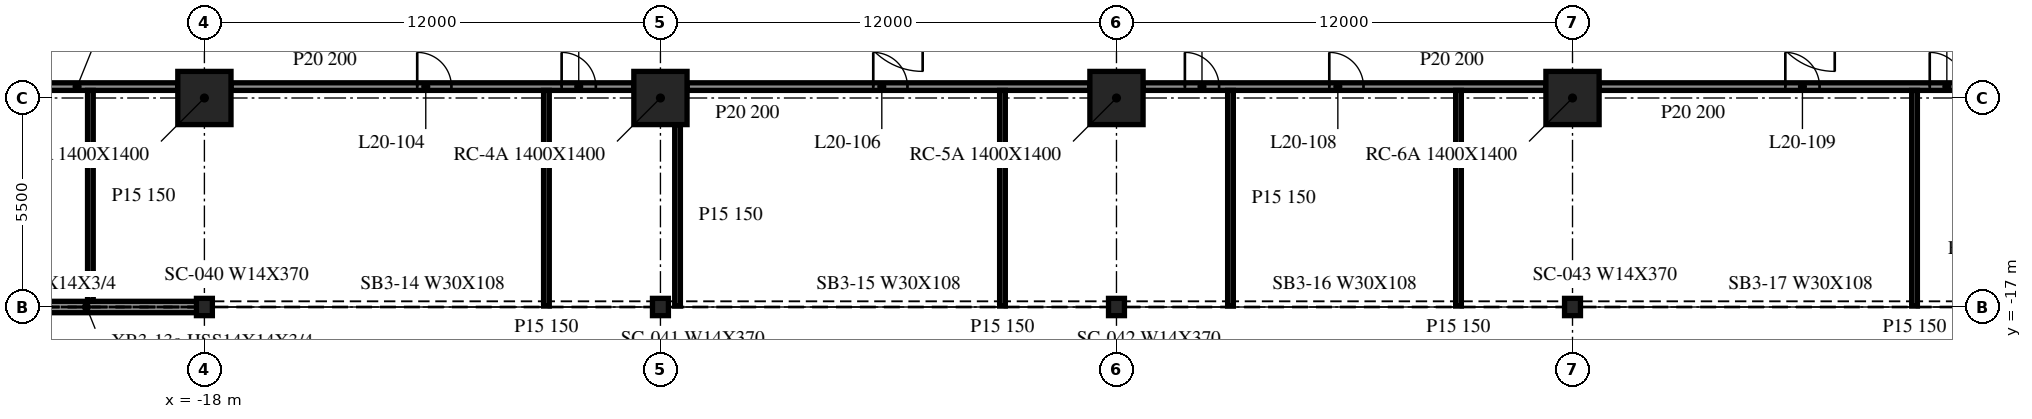
"""IFC4 building model, lengths in metres.
Left out: names, types, materials, properties, quantities, classifications, styles, units other than length and angle.
Written with IfcOpenShell. Run it as: python <this file> out.ifc"""

import sys

from ifc_helpers import new_model, si_unit, direction, frame, frame_2d, origin, origin_2d, place, context, subcontext, project, spatial, rectangle, i_section, extrude, element, fill, save


model = new_model("IFC4")
c1 = context("Model", 3, precision=1e-05, world=origin(), true_north=direction((0.0, 1.0)))
c2 = subcontext(c1, "Body", "Model", "MODEL_VIEW")
j1 = project(units=[si_unit("LENGTHUNIT", "METRE"), si_unit("PLANEANGLEUNIT", "RADIAN")], contexts=[c1])
p1 = place(None, origin())
s1 = spatial("IfcSite", under=j1, at=p1, CompositionType="ELEMENT")
p2 = place(p1, origin())
s2 = spatial("IfcBuilding", under=s1, at=p2, CompositionType="ELEMENT")
p3 = place(p2, frame((0.0, 0.0, 88.9)))
s3 = spatial("IfcBuildingStorey", under=s2, at=p3, CompositionType="ELEMENT", Elevation=88.9)
for number, where, z_axis, x_axis in (
    (1, (-18.0, -11.5, -0.34), (0.0, 0.0, 1.0), (1.0, 0.0, 0.0)),
    (2, (-6.0, -11.5, -0.34), (0.0, 0.0, 1.0), (1.0, 0.0, 0.0)),
    (3, (6.0, -11.5, -0.34), (0.0, 0.0, 1.0), (1.0, 0.0, 0.0)),
    (4, (18.0, -11.5, -0.34), (0.0, 0.0, 1.0), (1.0, 0.0, 0.0)),
):
    element("IfcColumn", number, at=place(p3, frame(where, z_axis=z_axis, x_axis=x_axis)), inside=s3, PredefinedType="COLUMN", context=c2, shape_type="SweptSolid", body=[
        extrude(rectangle(XDim=1.4, YDim=1.4, at=origin_2d()), origin(), (0.0, 0.0, 1.0), 4.1),
    ])
for number, where, z_axis, x_axis in (
    (5, (-18.0, -17.0, -0.34), (0.0, 0.0, 1.0), (1.0, 0.0, 0.0)),
    (6, (-6.0, -17.0, -0.34), (0.0, 0.0, 1.0), (1.0, 0.0, 0.0)),
    (7, (6.0, -17.0, -0.34), (0.0, 0.0, 1.0), (1.0, 0.0, 0.0)),
    (8, (18.0, -17.0, -0.34), (0.0, 0.0, 1.0), (1.0, 0.0, 0.0)),
):
    element("IfcColumn", number, at=place(p3, frame(where, z_axis=z_axis, x_axis=x_axis)), inside=s3, PredefinedType="COLUMN", context=c2, shape_type="SweptSolid", body=[
        extrude(i_section(OverallWidth=0.419, OverallDepth=0.455, WebThickness=0.042, FlangeThickness=0.068, at=origin_2d()), origin(), (0.0, 0.0, 1.0), 4.1),
    ])
p4 = place(p3, frame((-29.979, -17.0, 0.0), z_axis=(0.0, 0.0, 1.0), x_axis=(1.0, 0.0, 0.0)))
e9 = element("IfcWall", 9, at=p4, inside=s3, PredefinedType="NOTDEFINED", context=c2, shape_type="SweptSolid", body=[
    extrude(rectangle(XDim=11.958, YDim=0.3, at=frame_2d((5.979, 0.0))), origin(), (0.0, 0.0, 1.0), 3.003),
])
p5 = place(p3, frame((-29.3, -11.2, 0.0), z_axis=(0.0, 0.0, 1.0), x_axis=(1.0, 0.0, 0.0)))
e10 = element("IfcWall", 10, at=p5, inside=s3, PredefinedType="PARTITIONING", context=c2, shape_type="SweptSolid", body=[
    extrude(rectangle(XDim=10.6, YDim=0.2, at=frame_2d((5.3, 0.0))), origin(), (0.0, 0.0, 1.0), 3.76),
])
p6 = place(p5, frame((1.5, 0.0, 0.0)))
e11 = element("IfcOpeningElement", 11, at=p6, cuts=e10, PredefinedType="OPENING", context=c2, shape_type="SweptSolid", body=[
    extrude(rectangle(XDim=0.9, YDim=2.1, at=frame_2d((0.45, 1.05))), frame((0.0, 0.11, 0.0), z_axis=(0.0, -1.0, 0.0), x_axis=(1.0, 0.0, 0.0)), (0.0, 0.0, 1.0), 0.22),
])
p7 = place(p5, frame((4.9, 0.0, 0.0)))
e12 = element("IfcOpeningElement", 12, at=p7, cuts=e10, PredefinedType="OPENING", context=c2, shape_type="SweptSolid", body=[
    extrude(rectangle(XDim=0.9, YDim=2.1, at=frame_2d((0.45, 1.05))), frame((0.0, 0.11, 0.0), z_axis=(0.0, -1.0, 0.0), x_axis=(1.0, 0.0, 0.0)), (0.0, 0.0, 1.0), 0.22),
])
p8 = place(p3, frame((-17.3, -11.2, 0.0), z_axis=(0.0, 0.0, 1.0), x_axis=(1.0, 0.0, 0.0)))
e13 = element("IfcWall", 13, at=p8, inside=s3, PredefinedType="PARTITIONING", context=c2, shape_type="SweptSolid", body=[
    extrude(rectangle(XDim=10.6, YDim=0.2, at=frame_2d((5.3, 0.0))), origin(), (0.0, 0.0, 1.0), 3.76),
])
p9 = place(p8, frame((4.9, 0.0, 0.0)))
e14 = element("IfcOpeningElement", 14, at=p9, cuts=e13, PredefinedType="OPENING", context=c2, shape_type="SweptSolid", body=[
    extrude(rectangle(XDim=0.9, YDim=2.1, at=frame_2d((0.45, 1.05))), frame((0.0, 0.11, 0.0), z_axis=(0.0, -1.0, 0.0), x_axis=(1.0, 0.0, 0.0)), (0.0, 0.0, 1.0), 0.22),
])
p10 = place(p8, frame((8.7, 0.0, 0.0)))
e15 = element("IfcOpeningElement", 15, at=p10, cuts=e13, PredefinedType="OPENING", context=c2, shape_type="SweptSolid", body=[
    extrude(rectangle(XDim=0.9, YDim=2.1, at=frame_2d((0.45, 1.05))), frame((0.0, 0.11, 0.0), z_axis=(0.0, -1.0, 0.0), x_axis=(1.0, 0.0, 0.0)), (0.0, 0.0, 1.0), 0.22),
])
p11 = place(p3, frame((-5.3, -11.2, 0.0), z_axis=(0.0, 0.0, 1.0), x_axis=(1.0, 0.0, 0.0)))
e16 = element("IfcWall", 16, at=p11, inside=s3, PredefinedType="PARTITIONING", context=c2, shape_type="SweptSolid", body=[
    extrude(rectangle(XDim=10.6, YDim=0.2, at=frame_2d((5.3, 0.0))), origin(), (0.0, 0.0, 1.0), 3.76),
])
p12 = place(p11, frame((4.9, 0.0, 0.0)))
e17 = element("IfcOpeningElement", 17, at=p12, cuts=e16, PredefinedType="OPENING", context=c2, shape_type="SweptSolid", body=[
    extrude(rectangle(XDim=0.9, YDim=2.1, at=frame_2d((0.45, 1.05))), frame((0.0, 0.11, 0.0), z_axis=(0.0, -1.0, 0.0), x_axis=(1.0, 0.0, 0.0)), (0.0, 0.0, 1.0), 0.22),
])
p13 = place(p3, frame((6.7, -11.2, 0.0), z_axis=(0.0, 0.0, 1.0), x_axis=(1.0, 0.0, 0.0)))
e18 = element("IfcWall", 18, at=p13, inside=s3, PredefinedType="PARTITIONING", context=c2, shape_type="SweptSolid", body=[
    extrude(rectangle(XDim=10.6, YDim=0.2, at=frame_2d((5.3, 0.0))), origin(), (0.0, 0.0, 1.0), 3.76),
])
p14 = place(p13, frame((1.1, 0.0, 0.0)))
e19 = element("IfcOpeningElement", 19, at=p14, cuts=e18, PredefinedType="OPENING", context=c2, shape_type="SweptSolid", body=[
    extrude(rectangle(XDim=0.9, YDim=2.1, at=frame_2d((0.45, 1.05))), frame((0.0, 0.11, 0.0), z_axis=(0.0, -1.0, 0.0), x_axis=(1.0, 0.0, 0.0)), (0.0, 0.0, 1.0), 0.22),
])
p15 = place(p13, frame((4.9, 0.0, 0.0)))
e20 = element("IfcOpeningElement", 20, at=p15, cuts=e18, PredefinedType="OPENING", context=c2, shape_type="SweptSolid", body=[
    extrude(rectangle(XDim=0.9, YDim=2.1, at=frame_2d((0.45, 1.05))), frame((0.0, 0.11, 0.0), z_axis=(0.0, -1.0, 0.0), x_axis=(1.0, 0.0, 0.0)), (0.0, 0.0, 1.0), 0.22),
])
p16 = place(p3, frame((18.7, -11.2, 0.0), z_axis=(0.0, 0.0, 1.0), x_axis=(1.0, 0.0, 0.0)))
e21 = element("IfcWall", 21, at=p16, inside=s3, PredefinedType="PARTITIONING", context=c2, shape_type="SweptSolid", body=[
    extrude(rectangle(XDim=10.6, YDim=0.2, at=frame_2d((5.3, 0.0))), origin(), (0.0, 0.0, 1.0), 3.76),
])
p17 = place(p16, frame((4.9, 0.0, 0.0)))
e22 = element("IfcOpeningElement", 22, at=p17, cuts=e21, PredefinedType="OPENING", context=c2, shape_type="SweptSolid", body=[
    extrude(rectangle(XDim=0.9, YDim=2.1, at=frame_2d((0.45, 1.05))), frame((0.0, 0.11, 0.0), z_axis=(0.0, -1.0, 0.0), x_axis=(1.0, 0.0, 0.0)), (0.0, 0.0, 1.0), 0.22),
])
p18 = place(p16, frame((8.7, 0.0, 0.0)))
e23 = element("IfcOpeningElement", 23, at=p18, cuts=e21, PredefinedType="OPENING", context=c2, shape_type="SweptSolid", body=[
    extrude(rectangle(XDim=0.9, YDim=2.1, at=frame_2d((0.45, 1.05))), frame((0.0, 0.11, 0.0), z_axis=(0.0, -1.0, 0.0), x_axis=(1.0, 0.0, 0.0)), (0.0, 0.0, 1.0), 0.22),
])
p19 = place(p3, frame((-21.0, -16.85, 0.0), z_axis=(0.0, 0.0, 1.0), x_axis=(0.0, 1.0, 0.0)))
e24 = element("IfcWall", 24, at=p19, inside=s3, PredefinedType="PARTITIONING", context=c2, shape_type="SweptSolid", body=[
    extrude(rectangle(XDim=5.55, YDim=0.15, at=frame_2d((2.775, 0.0))), origin(), (0.0, 0.0, 1.0), 3.76),
])
p20 = place(p3, frame((-9.0, -16.975, 0.0), z_axis=(0.0, 0.0, 1.0), x_axis=(0.0, 1.0, 0.0)))
e25 = element("IfcWall", 25, at=p20, inside=s3, PredefinedType="PARTITIONING", context=c2, shape_type="SweptSolid", body=[
    extrude(rectangle(XDim=5.675, YDim=0.15, at=frame_2d((2.837, 0.0))), origin(), (0.0, 0.0, 1.0), 3.76),
])
p21 = place(p3, frame((-5.55, -16.975, 0.0), z_axis=(0.0, 0.0, 1.0), x_axis=(0.0, 1.0, 0.0)))
e26 = element("IfcWall", 26, at=p21, inside=s3, PredefinedType="PARTITIONING", context=c2, shape_type="SweptSolid", body=[
    extrude(rectangle(XDim=4.775, YDim=0.15, at=frame_2d((2.388, 0.0))), origin(), (0.0, 0.0, 1.0), 3.76),
])
for number, where, z_axis, x_axis in (
    (27, (3.0, -16.975, 0.0), (0.0, 0.0, 1.0), (0.0, 1.0, 0.0)),
    (28, (9.0, -16.975, 0.0), (0.0, 0.0, 1.0), (0.0, 1.0, 0.0)),
    (29, (15.0, -16.975, 0.0), (0.0, 0.0, 1.0), (0.0, 1.0, 0.0)),
    (30, (27.0, -16.975, 0.0), (0.0, 0.0, 1.0), (0.0, 1.0, 0.0)),
):
    element("IfcWall", number, at=place(p3, frame(where, z_axis=z_axis, x_axis=x_axis)), inside=s3, PredefinedType="PARTITIONING", context=c2, shape_type="SweptSolid", body=[
        extrude(rectangle(XDim=5.675, YDim=0.15, at=frame_2d((2.837, 0.0))), origin(), (0.0, 0.0, 1.0), 3.76),
    ])
p22 = place(p9, origin())
e31 = element("IfcDoor", 31, at=p22, inside=s3, OperationType="SINGLE_SWING_LEFT", PredefinedType="DOOR", context=c2, shape_type="SweptSolid", body=[
    extrude(rectangle(XDim=0.9, YDim=2.1, at=frame_2d((0.45, 1.05))), frame((0.0, 0.025, 0.0), z_axis=(0.0, -1.0, 0.0), x_axis=(1.0, 0.0, 0.0)), (0.0, 0.0, 1.0), 0.05),
])
fill(e14, e31)
p23 = place(p10, origin())
e32 = element("IfcDoor", 32, at=p23, inside=s3, OperationType="SINGLE_SWING_LEFT", PredefinedType="DOOR", context=c2, shape_type="SweptSolid", body=[
    extrude(rectangle(XDim=0.9, YDim=2.1, at=frame_2d((0.45, 1.05))), frame((0.0, 0.025, 0.0), z_axis=(0.0, -1.0, 0.0), x_axis=(1.0, 0.0, 0.0)), (0.0, 0.0, 1.0), 0.05),
])
fill(e15, e32)
p24 = place(p12, origin())
e33 = element("IfcDoor", 33, at=p24, inside=s3, OperationType="SINGLE_SWING_LEFT", PredefinedType="DOOR", context=c2, shape_type="SweptSolid", body=[
    extrude(rectangle(XDim=0.9, YDim=2.1, at=frame_2d((0.45, 1.05))), frame((0.0, 0.025, 0.0), z_axis=(0.0, -1.0, 0.0), x_axis=(1.0, 0.0, 0.0)), (0.0, 0.0, 1.0), 0.05),
])
fill(e17, e33)
p25 = place(p14, origin())
e34 = element("IfcDoor", 34, at=p25, inside=s3, OperationType="SINGLE_SWING_RIGHT", PredefinedType="DOOR", context=c2, shape_type="SweptSolid", body=[
    extrude(rectangle(XDim=0.9, YDim=2.1, at=frame_2d((0.45, 1.05))), frame((0.0, 0.025, 0.0), z_axis=(0.0, -1.0, 0.0), x_axis=(1.0, 0.0, 0.0)), (0.0, 0.0, 1.0), 0.05),
])
fill(e19, e34)
p26 = place(p15, origin())
e35 = element("IfcDoor", 35, at=p26, inside=s3, OperationType="SINGLE_SWING_LEFT", PredefinedType="DOOR", context=c2, shape_type="SweptSolid", body=[
    extrude(rectangle(XDim=0.9, YDim=2.1, at=frame_2d((0.45, 1.05))), frame((0.0, 0.025, 0.0), z_axis=(0.0, -1.0, 0.0), x_axis=(1.0, 0.0, 0.0)), (0.0, 0.0, 1.0), 0.05),
])
fill(e20, e35)
p27 = place(p17, origin())
e36 = element("IfcDoor", 36, at=p27, inside=s3, OperationType="SINGLE_SWING_LEFT", PredefinedType="DOOR", context=c2, shape_type="SweptSolid", body=[
    extrude(rectangle(XDim=0.9, YDim=2.1, at=frame_2d((0.45, 1.05))), frame((0.0, 0.025, 0.0), z_axis=(0.0, -1.0, 0.0), x_axis=(1.0, 0.0, 0.0)), (0.0, 0.0, 1.0), 0.05),
])
fill(e22, e36)
p28 = place(p18, origin())
e37 = element("IfcDoor", 37, at=p28, inside=s3, OperationType="SINGLE_SWING_LEFT", PredefinedType="DOOR", context=c2, shape_type="SweptSolid", body=[
    extrude(rectangle(XDim=0.9, YDim=2.1, at=frame_2d((0.45, 1.05))), frame((0.0, 0.025, 0.0), z_axis=(0.0, -1.0, 0.0), x_axis=(1.0, 0.0, 0.0)), (0.0, 0.0, 1.0), 0.05),
])
fill(e23, e37)
save(model, sys.argv[1])
